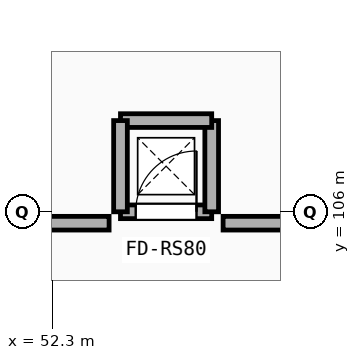
"""IFC4 building model, lengths in metres.
Left out: names, types, materials, properties, quantities, classifications, styles, units other than length and angle.
Written with IfcOpenShell. Run it as: python <this file> out.ifc"""

import sys

from ifc_helpers import new_model, si_unit, direction, frame, frame_2d, origin, place, context, subcontext, project, spatial, rectangle, extrude, element, fill, save


model = new_model("IFC4")
c1 = context("Model", 3, precision=1e-05, world=origin(), true_north=direction((0.0, 1.0)))
c2 = subcontext(c1, "Body", "Model", "MODEL_VIEW")
j1 = project(units=[si_unit("LENGTHUNIT", "METRE"), si_unit("PLANEANGLEUNIT", "RADIAN")], contexts=[c1])
p1 = place(None, origin())
s1 = spatial("IfcSite", under=j1, at=p1, CompositionType="ELEMENT")
p2 = place(p1, origin())
s2 = spatial("IfcBuilding", under=s1, at=p2, CompositionType="ELEMENT")
p3 = place(p2, frame((0.0, 0.0, 17.7)))
s3 = spatial("IfcBuildingStorey", under=s2, at=p3, CompositionType="ELEMENT", Elevation=17.7)
p4 = place(p3, frame((37.74, 105.85, 0.0), z_axis=(0.0, 0.0, 1.0), x_axis=(1.0, 0.0, 0.0)))
e1 = element("IfcWall", 1, at=p4, inside=s3, PredefinedType="PARTITIONING", context=c2, shape_type="SweptSolid", body=[
    extrude(rectangle(XDim=15.31, YDim=0.18, at=frame_2d((7.655, 0.0))), origin(), (0.0, 0.0, 1.0), 3.01),
])
p5 = place(p4, frame((4.387, 0.0, -0.01)))
e2 = element("IfcOpeningElement", 2, at=p5, cuts=e1, PredefinedType="OPENING", context=c2, shape_type="SweptSolid", body=[
    extrude(rectangle(XDim=1.6, YDim=2.21, at=frame_2d((0.8, 1.105))), frame((0.0, 0.1, 0.0), z_axis=(0.0, -1.0, 0.0), x_axis=(1.0, 0.0, 0.0)), (0.0, 0.0, 1.0), 0.2),
])
p6 = place(p3, frame((54.55, 105.85, 0.0), z_axis=(0.0, 0.0, 1.0), x_axis=(1.0, 0.0, 0.0)))
e3 = element("IfcWall", 3, at=p6, inside=s3, PredefinedType="PARTITIONING", context=c2, shape_type="SweptSolid", body=[
    extrude(rectangle(XDim=5.75, YDim=0.18, at=frame_2d((2.875, 0.0))), origin(), (0.0, 0.0, 1.0), 3.3),
])
p7 = place(p3, frame((53.2, 106.0, 0.0), z_axis=(0.0, 0.0, 1.0), x_axis=(1.0, 0.0, 0.0)))
e4 = element("IfcWall", 4, at=p7, inside=s3, PredefinedType="SOLIDWALL", context=c2, shape_type="SweptSolid", body=[
    extrude(rectangle(XDim=1.2, YDim=0.18, at=frame_2d((0.6, 0.0))), origin(), (0.0, 0.0, 1.0), 3.69),
])
p8 = place(p7, frame((0.2, 0.0, -0.01)))
e5 = element("IfcOpeningElement", 5, at=p8, cuts=e4, PredefinedType="OPENING", context=c2, shape_type="SweptSolid", body=[
    extrude(rectangle(XDim=0.8, YDim=2.06, at=frame_2d((0.4, 1.03))), frame((0.0, 0.1, 0.0), z_axis=(0.0, -1.0, 0.0), x_axis=(1.0, 0.0, 0.0)), (0.0, 0.0, 1.0), 0.2),
])
for number, where, z_axis, x_axis in (
    (6, (54.4, 106.0, 0.0), (0.0, 0.0, 1.0), (0.0, 1.0, 0.0)),
    (7, (54.4, 107.2, 0.0), (0.0, 0.0, 1.0), (-1.0, 0.0, 0.0)),
    (8, (53.2, 107.2, 0.0), (0.0, 0.0, 1.0), (0.0, -1.0, 0.0)),
):
    element("IfcWall", number, at=place(p3, frame(where, z_axis=z_axis, x_axis=x_axis)), inside=s3, PredefinedType="SOLIDWALL", context=c2, shape_type="SweptSolid", body=[
        extrude(rectangle(XDim=1.2, YDim=0.18, at=frame_2d((0.6, 0.0))), origin(), (0.0, 0.0, 1.0), 3.69),
    ])
p9 = place(p8, frame((0.0, 0.0, 0.01)))
e9 = element("IfcDoor", 9, at=p9, inside=s3, OperationType="SINGLE_SWING_RIGHT", PredefinedType="DOOR", context=c2, shape_type="SweptSolid", body=[
    extrude(rectangle(XDim=0.8, YDim=2.05, at=frame_2d((0.4, 1.025))), frame((0.0, 0.025, 0.0), z_axis=(0.0, -1.0, 0.0), x_axis=(1.0, 0.0, 0.0)), (0.0, 0.0, 1.0), 0.05),
])
fill(e5, e9)
save(model, sys.argv[1])
